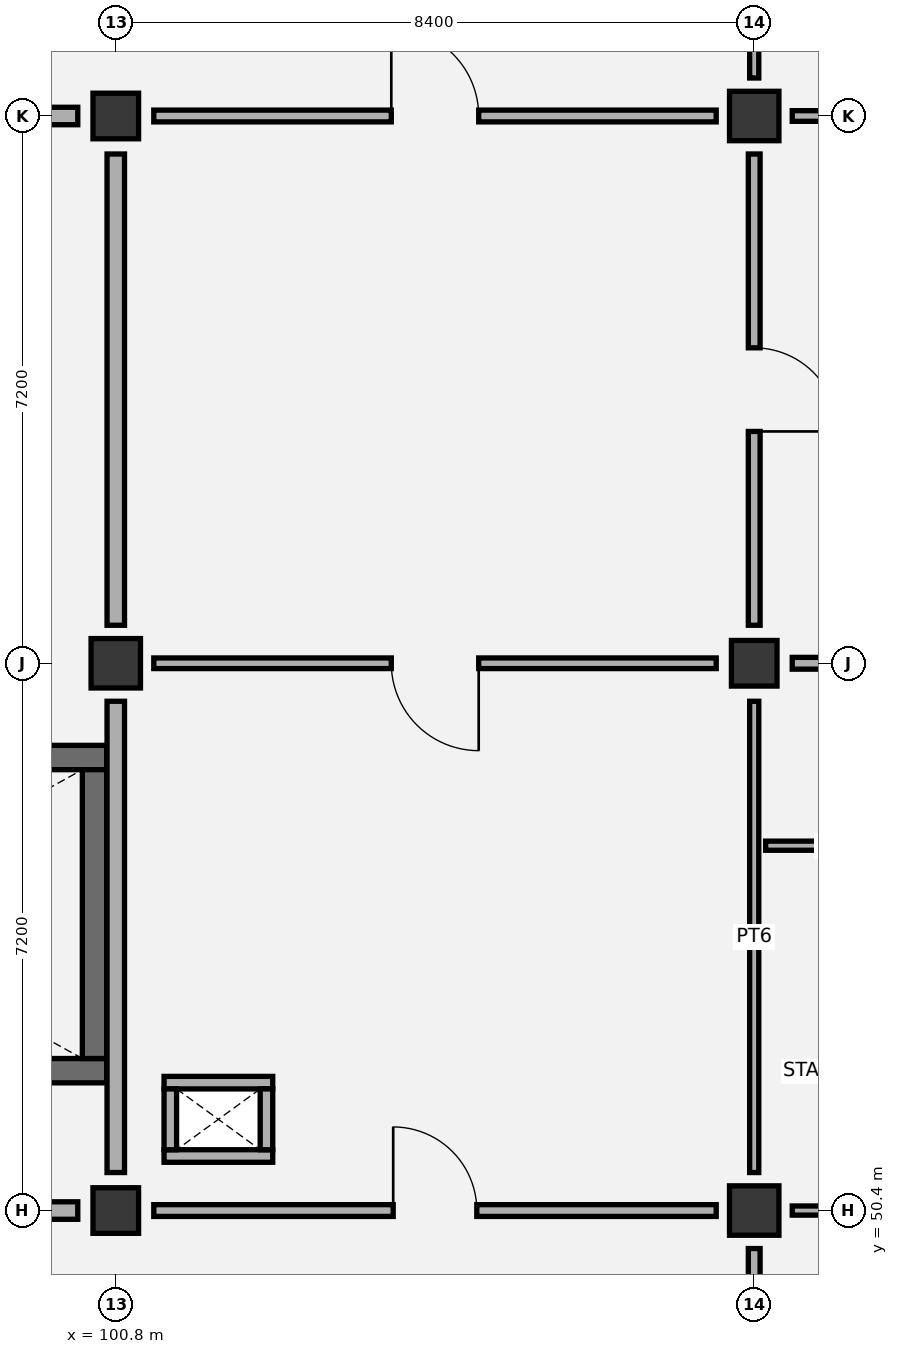
"""IFC4 building model, lengths in metres.
Left out: names, types, materials, properties, quantities, classifications, styles, units other than length and angle.
Written with IfcOpenShell. Run it as: python <this file> out.ifc"""

import sys

from ifc_helpers import new_model, si_unit, direction, frame, frame_2d, origin, origin_2d, place, context, subcontext, project, spatial, rectangle, extrude, element, fill, save


model = new_model("IFC4")
c1 = context("Model", 3, precision=1e-05, world=origin(), true_north=direction((0.0, 1.0)))
c2 = subcontext(c1, "Body", "Model", "MODEL_VIEW")
j1 = project(units=[si_unit("LENGTHUNIT", "METRE"), si_unit("PLANEANGLEUNIT", "RADIAN")], contexts=[c1])
p1 = place(None, origin())
s1 = spatial("IfcSite", under=j1, at=p1, CompositionType="ELEMENT")
p2 = place(p1, origin())
s2 = spatial("IfcBuilding", under=s1, at=p2, CompositionType="ELEMENT")
p3 = place(p2, frame((0.0, 0.0, 48.0)))
s3 = spatial("IfcBuildingStorey", under=s2, at=p3, CompositionType="ELEMENT", Elevation=48.0)
p4 = place(p3, frame((100.8, 50.4, 0.0), z_axis=(0.0, 0.0, 1.0), x_axis=(1.0, 0.0, 0.0)))
e1 = element("IfcColumn", 1, at=p4, inside=s3, PredefinedType="COLUMN", context=c2, shape_type="SweptSolid", body=[
    extrude(rectangle(XDim=0.6, YDim=0.6, at=origin_2d()), origin(), (0.0, 0.0, 1.0), 4.2),
])
p5 = place(p3, frame((100.8, 57.6, 0.0), z_axis=(0.0, 0.0, 1.0), x_axis=(1.0, 0.0, 0.0)))
e2 = element("IfcColumn", 2, at=p5, inside=s3, PredefinedType="COLUMN", context=c2, shape_type="SweptSolid", body=[
    extrude(rectangle(XDim=0.65, YDim=0.65, at=origin_2d()), origin(), (0.0, 0.0, 1.0), 4.2),
])
p6 = place(p3, frame((100.8, 64.8, 0.0), z_axis=(0.0, 0.0, 1.0), x_axis=(1.0, 0.0, 0.0)))
e3 = element("IfcColumn", 3, at=p6, inside=s3, PredefinedType="COLUMN", context=c2, shape_type="SweptSolid", body=[
    extrude(rectangle(XDim=0.6, YDim=0.6, at=origin_2d()), origin(), (0.0, 0.0, 1.0), 4.2),
])
p7 = place(p3, frame((109.2, 50.4, 0.0), z_axis=(0.0, 0.0, 1.0), x_axis=(1.0, 0.0, 0.0)))
e4 = element("IfcColumn", 4, at=p7, inside=s3, PredefinedType="COLUMN", context=c2, shape_type="SweptSolid", body=[
    extrude(rectangle(XDim=0.65, YDim=0.65, at=origin_2d()), origin(), (0.0, 0.0, 1.0), 4.2),
])
p8 = place(p3, frame((109.2, 57.6, 0.0), z_axis=(0.0, 0.0, 1.0), x_axis=(1.0, 0.0, 0.0)))
e5 = element("IfcColumn", 5, at=p8, inside=s3, PredefinedType="COLUMN", context=c2, shape_type="SweptSolid", body=[
    extrude(rectangle(XDim=0.6, YDim=0.6, at=origin_2d()), origin(), (0.0, 0.0, 1.0), 4.2),
])
p9 = place(p3, frame((109.2, 64.8, 0.0), z_axis=(0.0, 0.0, 1.0), x_axis=(1.0, 0.0, 0.0)))
e6 = element("IfcColumn", 6, at=p9, inside=s3, PredefinedType="COLUMN", context=c2, shape_type="SweptSolid", body=[
    extrude(rectangle(XDim=0.65, YDim=0.65, at=origin_2d()), origin(), (0.0, 0.0, 1.0), 4.2),
])
p10 = place(p3, frame((93.2, 52.24, 0.0), z_axis=(0.0, 0.0, 1.0), x_axis=(1.0, 0.0, 0.0)))
e7 = element("IfcWall", 7, at=p10, inside=s3, PredefinedType="SHEAR", context=c2, shape_type="SweptSolid", body=[
    extrude(rectangle(XDim=7.48, YDim=0.32, at=frame_2d((3.74, 0.0))), origin(), (0.0, 0.0, 1.0), 3.92),
])
p11 = place(p10, frame((0.45, 0.0, 0.0)))
e8 = element("IfcOpeningElement", 8, at=p11, cuts=e7, PredefinedType="OPENING", context=c2, shape_type="SweptSolid", body=[
    extrude(rectangle(XDim=1.05, YDim=2.15, at=frame_2d((0.525, 1.075))), frame((0.0, 0.17, 0.0), z_axis=(0.0, -1.0, 0.0), x_axis=(1.0, 0.0, 0.0)), (0.0, 0.0, 1.0), 0.34),
])
p12 = place(p3, frame((93.2, 56.36, 0.0), z_axis=(0.0, 0.0, 1.0), x_axis=(1.0, 0.0, 0.0)))
e9 = element("IfcWall", 9, at=p12, inside=s3, PredefinedType="SHEAR", context=c2, shape_type="SweptSolid", body=[
    extrude(rectangle(XDim=7.48, YDim=0.32, at=frame_2d((3.74, 0.0))), origin(), (0.0, 0.0, 1.0), 3.92),
])
p13 = place(p3, frame((100.52, 52.4, 0.0), z_axis=(0.0, 0.0, 1.0), x_axis=(0.0, 1.0, 0.0)))
e10 = element("IfcWall", 10, at=p13, inside=s3, PredefinedType="SHEAR", context=c2, shape_type="SweptSolid", body=[
    extrude(rectangle(XDim=3.8, YDim=0.32, at=frame_2d((1.9, 0.0))), origin(), (0.0, 0.0, 1.0), 3.92),
])
for number, where, z_axis, x_axis in (
    (11, (101.435, 51.117, 0.0), (0.0, 0.0, 1.0), (1.0, 0.0, 0.0)),
    (12, (101.435, 52.083, 0.0), (0.0, 0.0, 1.0), (1.0, 0.0, 0.0)),
):
    element("IfcWall", number, at=place(p3, frame(where, z_axis=z_axis, x_axis=x_axis)), inside=s3, PredefinedType="PARTITIONING", context=c2, shape_type="SweptSolid", body=[
        extrude(rectangle(XDim=1.43, YDim=0.165, at=frame_2d((0.715, 0.0))), origin(), (0.0, 0.0, 1.0), 3.92),
    ])
for number, where, z_axis, x_axis in (
    (13, (101.518, 51.2, 0.0), (0.0, 0.0, 1.0), (0.0, 1.0, 0.0)),
    (14, (102.782, 51.2, 0.0), (0.0, 0.0, 1.0), (0.0, 1.0, 0.0)),
):
    element("IfcWall", number, at=place(p3, frame(where, z_axis=z_axis, x_axis=x_axis)), inside=s3, PredefinedType="PARTITIONING", context=c2, shape_type="SweptSolid", body=[
        extrude(rectangle(XDim=0.8, YDim=0.165, at=frame_2d((0.4, 0.0))), origin(), (0.0, 0.0, 1.0), 3.92),
    ])
p14 = place(p3, frame((109.35, 55.2, 0.0), z_axis=(0.0, 0.0, 1.0), x_axis=(1.0, 0.0, 0.0)))
e15 = element("IfcWall", 15, at=p14, inside=s3, PredefinedType="PARTITIONING", context=c2, shape_type="SweptSolid", body=[
    extrude(rectangle(XDim=8.1, YDim=0.12, at=frame_2d((4.05, 0.0))), origin(), (0.0, 0.0, 1.0), 3.92),
])
p15 = place(p14, frame((1.08, 0.0, 0.0)))
e16 = element("IfcOpeningElement", 16, at=p15, cuts=e15, PredefinedType="OPENING", context=c2, shape_type="SweptSolid", body=[
    extrude(rectangle(XDim=0.95, YDim=2.1, at=frame_2d((0.475, 1.05))), frame((0.0, 0.07, 0.0), z_axis=(0.0, -1.0, 0.0), x_axis=(1.0, 0.0, 0.0)), (0.0, 0.0, 1.0), 0.14),
])
p16 = place(p14, frame((3.63, 0.0, 0.0)))
e17 = element("IfcOpeningElement", 17, at=p16, cuts=e15, PredefinedType="OPENING", context=c2, shape_type="SweptSolid", body=[
    extrude(rectangle(XDim=0.9, YDim=2.1, at=frame_2d((0.45, 1.05))), frame((0.0, 0.07, 0.0), z_axis=(0.0, -1.0, 0.0), x_axis=(1.0, 0.0, 0.0)), (0.0, 0.0, 1.0), 0.14),
])
p17 = place(p14, frame((6.13, 0.0, 0.0)))
e18 = element("IfcOpeningElement", 18, at=p17, cuts=e15, PredefinedType="OPENING", context=c2, shape_type="SweptSolid", body=[
    extrude(rectangle(XDim=1.0, YDim=2.1, at=frame_2d((0.5, 1.05))), frame((0.0, 0.07, 0.0), z_axis=(0.0, -1.0, 0.0), x_axis=(1.0, 0.0, 0.0)), (0.0, 0.0, 1.0), 0.14),
])
p18 = place(p3, frame((92.9, 50.4, 0.0), z_axis=(0.0, 0.0, 1.0), x_axis=(1.0, 0.0, 0.0)))
e19 = element("IfcWall", 19, at=p18, inside=s3, PredefinedType="PARTITIONING", context=c2, shape_type="SweptSolid", body=[
    extrude(rectangle(XDim=7.4, YDim=0.23, at=frame_2d((3.7, 0.0))), origin(), (0.0, 0.0, 1.0), 3.365),
])
p19 = place(p18, frame((2.95, 0.0, 0.0)))
e20 = element("IfcOpeningElement", 20, at=p19, cuts=e19, PredefinedType="OPENING", context=c2, shape_type="SweptSolid", body=[
    extrude(rectangle(XDim=1.5, YDim=2.15, at=frame_2d((0.75, 1.075))), frame((0.0, 0.125, 0.0), z_axis=(0.0, -1.0, 0.0), x_axis=(1.0, 0.0, 0.0)), (0.0, 0.0, 1.0), 0.25),
])
p20 = place(p3, frame((100.8, 50.9, 0.0), z_axis=(0.0, 0.0, 1.0), x_axis=(0.0, 1.0, 0.0)))
e21 = element("IfcWall", 21, at=p20, inside=s3, PredefinedType="PARTITIONING", context=c2, shape_type="SweptSolid", body=[
    extrude(rectangle(XDim=6.2, YDim=0.23, at=frame_2d((3.1, 0.0))), origin(), (0.0, 0.0, 1.0), 3.415),
])
p21 = place(p3, frame((100.8, 58.1, 0.0), z_axis=(0.0, 0.0, 1.0), x_axis=(0.0, 1.0, 0.0)))
e22 = element("IfcWall", 22, at=p21, inside=s3, PredefinedType="PARTITIONING", context=c2, shape_type="SweptSolid", body=[
    extrude(rectangle(XDim=6.2, YDim=0.23, at=frame_2d((3.1, 0.0))), origin(), (0.0, 0.0, 1.0), 3.515),
])
p22 = place(p3, frame((92.9, 64.8, 0.0), z_axis=(0.0, 0.0, 1.0), x_axis=(1.0, 0.0, 0.0)))
e23 = element("IfcWall", 23, at=p22, inside=s3, PredefinedType="PARTITIONING", context=c2, shape_type="SweptSolid", body=[
    extrude(rectangle(XDim=7.4, YDim=0.23, at=frame_2d((3.7, 0.0))), origin(), (0.0, 0.0, 1.0), 3.365),
])
p23 = place(p3, frame((109.2, 43.7, 0.0), z_axis=(0.0, 0.0, 1.0), x_axis=(0.0, 1.0, 0.0)))
e24 = element("IfcWall", 24, at=p23, inside=s3, PredefinedType="PARTITIONING", context=c2, shape_type="SweptSolid", body=[
    extrude(rectangle(XDim=6.2, YDim=0.155, at=frame_2d((3.1, 0.0))), origin(), (0.0, 0.0, 1.0), 3.415),
])
p24 = place(p23, frame((2.525, 0.0, 0.0)))
e25 = element("IfcOpeningElement", 25, at=p24, cuts=e24, PredefinedType="OPENING", context=c2, shape_type="SweptSolid", body=[
    extrude(rectangle(XDim=1.15, YDim=2.1, at=frame_2d((0.575, 1.05))), frame((0.0, 0.087, 0.0), z_axis=(0.0, -1.0, 0.0), x_axis=(1.0, 0.0, 0.0)), (0.0, 0.0, 1.0), 0.175),
])
p25 = place(p3, frame((101.3, 50.4, 0.0), z_axis=(0.0, 0.0, 1.0), x_axis=(1.0, 0.0, 0.0)))
e26 = element("IfcWall", 26, at=p25, inside=s3, PredefinedType="PARTITIONING", context=c2, shape_type="SweptSolid", body=[
    extrude(rectangle(XDim=7.4, YDim=0.155, at=frame_2d((3.7, 0.0))), origin(), (0.0, 0.0, 1.0), 3.365),
])
p26 = place(p25, frame((3.15, 0.0, 0.0)))
e27 = element("IfcOpeningElement", 27, at=p26, cuts=e26, PredefinedType="OPENING", context=c2, shape_type="SweptSolid", body=[
    extrude(rectangle(XDim=1.1, YDim=2.1, at=frame_2d((0.55, 1.05))), frame((0.0, 0.087, 0.0), z_axis=(0.0, -1.0, 0.0), x_axis=(1.0, 0.0, 0.0)), (0.0, 0.0, 1.0), 0.175),
])
p27 = place(p3, frame((109.2, 50.9, 0.0), z_axis=(0.0, 0.0, 1.0), x_axis=(0.0, 1.0, 0.0)))
e28 = element("IfcWall", 28, at=p27, inside=s3, PredefinedType="PARTITIONING", context=c2, shape_type="SweptSolid", body=[
    extrude(rectangle(XDim=6.2, YDim=0.12, at=frame_2d((3.1, 0.0))), origin(), (0.0, 0.0, 1.0), 3.515),
])
p28 = place(p3, frame((101.3, 57.6, 0.0), z_axis=(0.0, 0.0, 1.0), x_axis=(1.0, 0.0, 0.0)))
e29 = element("IfcWall", 29, at=p28, inside=s3, PredefinedType="PARTITIONING", context=c2, shape_type="SweptSolid", body=[
    extrude(rectangle(XDim=7.4, YDim=0.14, at=frame_2d((3.7, 0.0))), origin(), (0.0, 0.0, 1.0), 3.365),
])
p29 = place(p28, frame((3.125, 0.0, 0.0)))
e30 = element("IfcOpeningElement", 30, at=p29, cuts=e29, PredefinedType="OPENING", context=c2, shape_type="SweptSolid", body=[
    extrude(rectangle(XDim=1.15, YDim=2.1, at=frame_2d((0.575, 1.05))), frame((0.0, 0.08, 0.0), z_axis=(0.0, -1.0, 0.0), x_axis=(1.0, 0.0, 0.0)), (0.0, 0.0, 1.0), 0.16),
])
p30 = place(p3, frame((109.2, 58.1, 0.0), z_axis=(0.0, 0.0, 1.0), x_axis=(0.0, 1.0, 0.0)))
e31 = element("IfcWall", 31, at=p30, inside=s3, PredefinedType="PARTITIONING", context=c2, shape_type="SweptSolid", body=[
    extrude(rectangle(XDim=6.2, YDim=0.155, at=frame_2d((3.1, 0.0))), origin(), (0.0, 0.0, 1.0), 3.415),
])
p31 = place(p30, frame((2.55, 0.0, 0.0)))
e32 = element("IfcOpeningElement", 32, at=p31, cuts=e31, PredefinedType="OPENING", context=c2, shape_type="SweptSolid", body=[
    extrude(rectangle(XDim=1.1, YDim=2.1, at=frame_2d((0.55, 1.05))), frame((0.0, 0.087, 0.0), z_axis=(0.0, -1.0, 0.0), x_axis=(1.0, 0.0, 0.0)), (0.0, 0.0, 1.0), 0.175),
])
p32 = place(p3, frame((101.3, 64.8, 0.0), z_axis=(0.0, 0.0, 1.0), x_axis=(1.0, 0.0, 0.0)))
e33 = element("IfcWall", 33, at=p32, inside=s3, PredefinedType="PARTITIONING", context=c2, shape_type="SweptSolid", body=[
    extrude(rectangle(XDim=7.4, YDim=0.155, at=frame_2d((3.7, 0.0))), origin(), (0.0, 0.0, 1.0), 3.365),
])
p33 = place(p32, frame((3.125, 0.0, 0.0)))
e34 = element("IfcOpeningElement", 34, at=p33, cuts=e33, PredefinedType="OPENING", context=c2, shape_type="SweptSolid", body=[
    extrude(rectangle(XDim=1.15, YDim=2.1, at=frame_2d((0.575, 1.05))), frame((0.0, 0.087, 0.0), z_axis=(0.0, -1.0, 0.0), x_axis=(1.0, 0.0, 0.0)), (0.0, 0.0, 1.0), 0.175),
])
p34 = place(p3, frame((109.2, 65.3, 0.0), z_axis=(0.0, 0.0, 1.0), x_axis=(0.0, 1.0, 0.0)))
e35 = element("IfcWall", 35, at=p34, inside=s3, PredefinedType="PARTITIONING", context=c2, shape_type="SweptSolid", body=[
    extrude(rectangle(XDim=6.2, YDim=0.12, at=frame_2d((3.1, 0.0))), origin(), (0.0, 0.0, 1.0), 3.625),
])
p35 = place(p3, frame((109.7, 50.4, 0.0), z_axis=(0.0, 0.0, 1.0), x_axis=(1.0, 0.0, 0.0)))
e36 = element("IfcWall", 36, at=p35, inside=s3, PredefinedType="PARTITIONING", context=c2, shape_type="SweptSolid", body=[
    extrude(rectangle(XDim=7.4, YDim=0.12, at=frame_2d((3.7, 0.0))), origin(), (0.0, 0.0, 1.0), 3.365),
])
p36 = place(p3, frame((109.7, 57.6, 0.0), z_axis=(0.0, 0.0, 1.0), x_axis=(1.0, 0.0, 0.0)))
e37 = element("IfcWall", 37, at=p36, inside=s3, PredefinedType="PARTITIONING", context=c2, shape_type="SweptSolid", body=[
    extrude(rectangle(XDim=7.4, YDim=0.155, at=frame_2d((3.7, 0.0))), origin(), (0.0, 0.0, 1.0), 3.365),
])
p37 = place(p36, frame((3.15, 0.0, 0.0)))
e38 = element("IfcOpeningElement", 38, at=p37, cuts=e37, PredefinedType="OPENING", context=c2, shape_type="SweptSolid", body=[
    extrude(rectangle(XDim=1.1, YDim=2.1, at=frame_2d((0.55, 1.05))), frame((0.0, 0.087, 0.0), z_axis=(0.0, -1.0, 0.0), x_axis=(1.0, 0.0, 0.0)), (0.0, 0.0, 1.0), 0.175),
])
p38 = place(p3, frame((109.7, 64.8, 0.0), z_axis=(0.0, 0.0, 1.0), x_axis=(1.0, 0.0, 0.0)))
e39 = element("IfcWall", 39, at=p38, inside=s3, PredefinedType="PARTITIONING", context=c2, shape_type="SweptSolid", body=[
    extrude(rectangle(XDim=7.4, YDim=0.14, at=frame_2d((3.7, 0.0))), origin(), (0.0, 0.0, 1.0), 3.365),
])
p39 = place(p38, frame((3.125, 0.0, 0.0)))
e40 = element("IfcOpeningElement", 40, at=p39, cuts=e39, PredefinedType="OPENING", context=c2, shape_type="SweptSolid", body=[
    extrude(rectangle(XDim=1.15, YDim=2.1, at=frame_2d((0.575, 1.05))), frame((0.0, 0.08, 0.0), z_axis=(0.0, -1.0, 0.0), x_axis=(1.0, 0.0, 0.0)), (0.0, 0.0, 1.0), 0.16),
])
p40 = place(p26, origin())
e41 = element("IfcDoor", 41, at=p40, inside=s3, OperationType="SINGLE_SWING_LEFT", PredefinedType="DOOR", context=c2, shape_type="SweptSolid", body=[
    extrude(rectangle(XDim=1.1, YDim=2.1, at=frame_2d((0.55, 1.05))), frame((0.0, 0.025, 0.0), z_axis=(0.0, -1.0, 0.0), x_axis=(1.0, 0.0, 0.0)), (0.0, 0.0, 1.0), 0.05),
])
fill(e27, e41)
p41 = place(p29, frame((1.15, 0.0, 0.0), z_axis=(0.0, 0.0, 1.0), x_axis=(-1.0, 0.0, 0.0)))
e42 = element("IfcDoor", 42, at=p41, inside=s3, OperationType="SINGLE_SWING_LEFT", PredefinedType="DOOR", context=c2, shape_type="SweptSolid", body=[
    extrude(rectangle(XDim=1.15, YDim=2.1, at=frame_2d((0.575, 1.05))), frame((0.0, 0.025, 0.0), z_axis=(0.0, -1.0, 0.0), x_axis=(1.0, 0.0, 0.0)), (0.0, 0.0, 1.0), 0.05),
])
fill(e30, e42)
p42 = place(p31, frame((1.1, 0.0, 0.0), z_axis=(0.0, 0.0, 1.0), x_axis=(-1.0, 0.0, 0.0)))
e43 = element("IfcDoor", 43, at=p42, inside=s3, OperationType="SINGLE_SWING_RIGHT", PredefinedType="DOOR", context=c2, shape_type="SweptSolid", body=[
    extrude(rectangle(XDim=1.1, YDim=2.1, at=frame_2d((0.55, 1.05))), frame((0.0, 0.025, 0.0), z_axis=(0.0, -1.0, 0.0), x_axis=(1.0, 0.0, 0.0)), (0.0, 0.0, 1.0), 0.05),
])
fill(e32, e43)
p43 = place(p33, origin())
e44 = element("IfcDoor", 44, at=p43, inside=s3, OperationType="SINGLE_SWING_LEFT", PredefinedType="DOOR", context=c2, shape_type="SweptSolid", body=[
    extrude(rectangle(XDim=1.15, YDim=2.1, at=frame_2d((0.575, 1.05))), frame((0.0, 0.025, 0.0), z_axis=(0.0, -1.0, 0.0), x_axis=(1.0, 0.0, 0.0)), (0.0, 0.0, 1.0), 0.05),
])
fill(e34, e44)
save(model, sys.argv[1])
